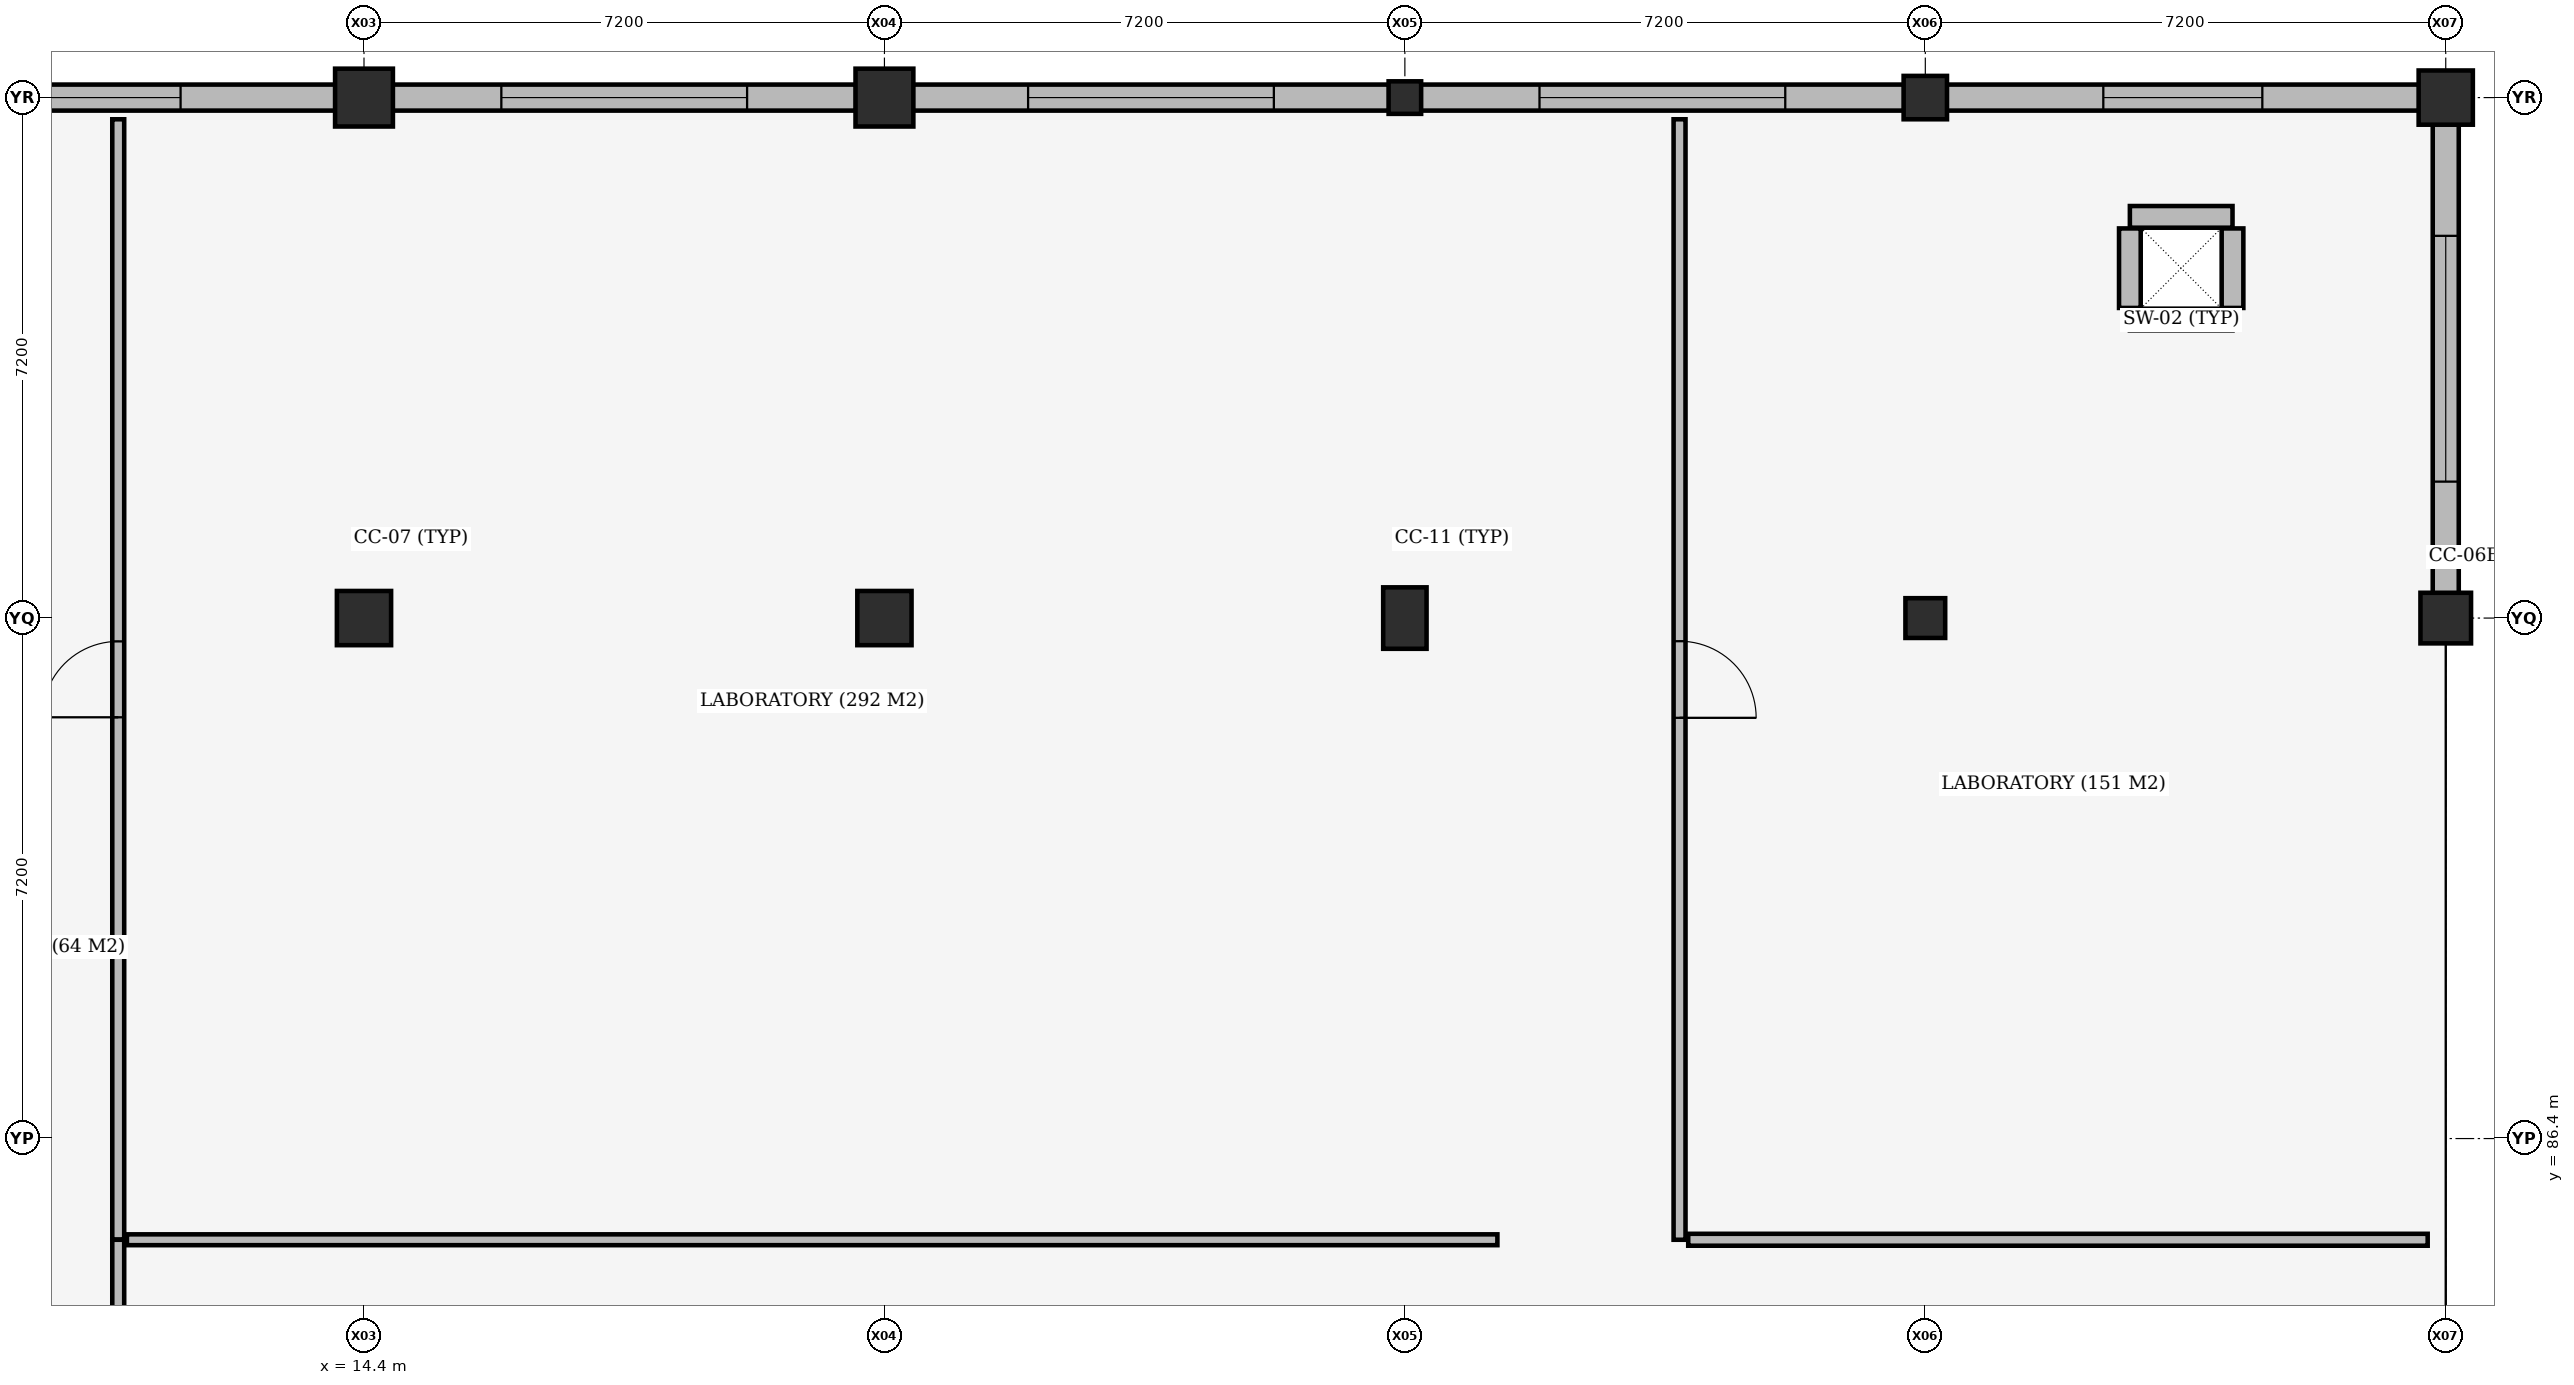
"""IFC4 building model, lengths in metres.
Left out: names, types, materials, properties, quantities, classifications, styles, units other than length and angle.
Written with IfcOpenShell. Run it as: python <this file> out.ifc"""

import sys

from ifc_helpers import new_model, si_unit, direction, frame, frame_2d, origin, origin_2d, place, context, subcontext, project, spatial, rectangle, extrude, element, fill, save


model = new_model("IFC4")
c1 = context("Model", 3, precision=1e-05, world=origin(), true_north=direction((0.0, 1.0)))
c2 = subcontext(c1, "Body", "Model", "MODEL_VIEW")
j1 = project(units=[si_unit("LENGTHUNIT", "METRE"), si_unit("PLANEANGLEUNIT", "RADIAN")], contexts=[c1])
p1 = place(None, origin())
s1 = spatial("IfcSite", under=j1, at=p1, CompositionType="ELEMENT")
p2 = place(p1, origin())
s2 = spatial("IfcBuilding", under=s1, at=p2, CompositionType="ELEMENT")
p3 = place(p2, frame((0.0, 0.0, 5.4)))
s3 = spatial("IfcBuildingStorey", under=s2, at=p3, CompositionType="ELEMENT", Elevation=5.4)
p4 = place(p3, frame((38.83, 97.73, 0.0), z_axis=(0.0, 0.0, 1.0), x_axis=(1.0, 0.0, 0.0)))
e1 = element("IfcWall", 1, at=p4, inside=s3, PredefinedType="SHEAR", context=c2, shape_type="SweptSolid", body=[
    extrude(rectangle(XDim=1.42, YDim=0.3, at=frame_2d((0.71, 0.0))), origin(), (0.0, 0.0, 1.0), 3.96),
])
p5 = place(p3, frame((40.25, 97.89, 0.0), z_axis=(0.0, 0.0, 1.0), x_axis=(0.0, 1.0, 0.0)))
e2 = element("IfcWall", 2, at=p5, inside=s3, PredefinedType="SHEAR", context=c2, shape_type="SweptSolid", body=[
    extrude(rectangle(XDim=1.1, YDim=0.3, at=frame_2d((0.55, 0.0))), origin(), (0.0, 0.0, 1.0), 3.96),
])
p6 = place(p3, frame((40.25, 99.15, 0.0), z_axis=(0.0, 0.0, 1.0), x_axis=(-1.0, 0.0, 0.0)))
e3 = element("IfcWall", 3, at=p6, inside=s3, PredefinedType="SHEAR", context=c2, shape_type="SweptSolid", body=[
    extrude(rectangle(XDim=1.42, YDim=0.3, at=frame_2d((0.71, 0.0))), origin(), (0.0, 0.0, 1.0), 3.96),
])
p7 = place(p3, frame((38.83, 98.99, 0.0), z_axis=(0.0, 0.0, 1.0), x_axis=(0.0, -1.0, 0.0)))
e4 = element("IfcWall", 4, at=p7, inside=s3, PredefinedType="SHEAR", context=c2, shape_type="SweptSolid", body=[
    extrude(rectangle(XDim=1.1, YDim=0.3, at=frame_2d((0.55, 0.0))), origin(), (0.0, 0.0, 1.0), 3.96),
])
p8 = place(p3, frame((14.4, 93.6, 0.0), z_axis=(0.0, 0.0, 1.0), x_axis=(1.0, 0.0, 0.0)))
e5 = element("IfcColumn", 5, at=p8, inside=s3, PredefinedType="COLUMN", context=c2, shape_type="SweptSolid", body=[
    extrude(rectangle(XDim=0.75, YDim=0.75, at=origin_2d()), origin(), (0.0, 0.0, 1.0), 3.89),
])
p9 = place(p3, frame((14.4, 100.8, 0.0), z_axis=(0.0, 0.0, 1.0), x_axis=(1.0, 0.0, 0.0)))
e6 = element("IfcColumn", 6, at=p9, inside=s3, PredefinedType="COLUMN", context=c2, shape_type="SweptSolid", body=[
    extrude(rectangle(XDim=0.8, YDim=0.8, at=origin_2d()), origin(), (0.0, 0.0, 1.0), 3.89),
])
p10 = place(p3, frame((21.6, 93.6, 0.0), z_axis=(0.0, 0.0, 1.0), x_axis=(1.0, 0.0, 0.0)))
e7 = element("IfcColumn", 7, at=p10, inside=s3, PredefinedType="COLUMN", context=c2, shape_type="SweptSolid", body=[
    extrude(rectangle(XDim=0.75, YDim=0.75, at=origin_2d()), origin(), (0.0, 0.0, 1.0), 3.89),
])
p11 = place(p3, frame((21.6, 100.8, 0.0), z_axis=(0.0, 0.0, 1.0), x_axis=(1.0, 0.0, 0.0)))
e8 = element("IfcColumn", 8, at=p11, inside=s3, PredefinedType="COLUMN", context=c2, shape_type="SweptSolid", body=[
    extrude(rectangle(XDim=0.8, YDim=0.8, at=origin_2d()), origin(), (0.0, 0.0, 1.0), 3.89),
])
p12 = place(p3, frame((28.8, 93.6, 0.0), z_axis=(0.0, 0.0, 1.0), x_axis=(1.0, 0.0, 0.0)))
e9 = element("IfcColumn", 9, at=p12, inside=s3, PredefinedType="COLUMN", context=c2, shape_type="SweptSolid", body=[
    extrude(rectangle(XDim=0.6, YDim=0.85, at=origin_2d()), origin(), (0.0, 0.0, 1.0), 3.89),
])
p13 = place(p3, frame((28.8, 100.8, 0.0), z_axis=(0.0, 0.0, 1.0), x_axis=(1.0, 0.0, 0.0)))
e10 = element("IfcColumn", 10, at=p13, inside=s3, PredefinedType="COLUMN", context=c2, shape_type="SweptSolid", body=[
    extrude(rectangle(XDim=0.45, YDim=0.45, at=origin_2d()), origin(), (0.0, 0.0, 1.0), 3.89),
])
p14 = place(p3, frame((36.0, 93.6, 0.0), z_axis=(0.0, 0.0, 1.0), x_axis=(1.0, 0.0, 0.0)))
e11 = element("IfcColumn", 11, at=p14, inside=s3, PredefinedType="COLUMN", context=c2, shape_type="SweptSolid", body=[
    extrude(rectangle(XDim=0.55, YDim=0.55, at=origin_2d()), origin(), (0.0, 0.0, 1.0), 3.89),
])
p15 = place(p3, frame((36.0, 100.8, 0.0), z_axis=(0.0, 0.0, 1.0), x_axis=(1.0, 0.0, 0.0)))
e12 = element("IfcColumn", 12, at=p15, inside=s3, PredefinedType="COLUMN", context=c2, shape_type="SweptSolid", body=[
    extrude(rectangle(XDim=0.6, YDim=0.6, at=origin_2d()), origin(), (0.0, 0.0, 1.0), 3.89),
])
p16 = place(p3, frame((43.2, 93.6, 0.0), z_axis=(0.0, 0.0, 1.0), x_axis=(1.0, 0.0, 0.0)))
e13 = element("IfcColumn", 13, at=p16, inside=s3, PredefinedType="COLUMN", context=c2, shape_type="SweptSolid", body=[
    extrude(rectangle(XDim=0.7, YDim=0.7, at=origin_2d()), origin(), (0.0, 0.0, 1.0), 3.89),
])
p17 = place(p3, frame((43.2, 100.8, 0.0), z_axis=(0.0, 0.0, 1.0), x_axis=(1.0, 0.0, 0.0)))
e14 = element("IfcColumn", 14, at=p17, inside=s3, PredefinedType="COLUMN", context=c2, shape_type="SweptSolid", body=[
    extrude(rectangle(XDim=0.75, YDim=0.75, at=origin_2d()), origin(), (0.0, 0.0, 1.0), 3.89),
])
p18 = place(p3, frame((7.517, 100.8, 0.0), z_axis=(0.0, 0.0, 1.0), x_axis=(1.0, 0.0, 0.0)))
e15 = element("IfcWall", 15, at=p18, inside=s3, PredefinedType="STANDARD", context=c2, shape_type="SweptSolid", body=[
    extrude(rectangle(XDim=6.491, YDim=0.36, at=frame_2d((3.246, 0.0))), origin(), (0.0, 0.0, 1.0), 3.31),
])
p19 = place(p18, frame((2.146, 0.0, 0.9)))
e16 = element("IfcOpeningElement", 16, at=p19, cuts=e15, PredefinedType="OPENING", context=c2, shape_type="SweptSolid", body=[
    extrude(rectangle(XDim=2.2, YDim=2.2, at=frame_2d((1.1, 1.1))), frame((0.0, 0.19, 0.0), z_axis=(0.0, -1.0, 0.0), x_axis=(1.0, 0.0, 0.0)), (0.0, 0.0, 1.0), 0.38),
])
p20 = place(p3, frame((14.792, 100.8, 0.0), z_axis=(0.0, 0.0, 1.0), x_axis=(1.0, 0.0, 0.0)))
e17 = element("IfcWall", 17, at=p20, inside=s3, PredefinedType="STANDARD", context=c2, shape_type="SweptSolid", body=[
    extrude(rectangle(XDim=6.416, YDim=0.36, at=frame_2d((3.208, 0.0))), origin(), (0.0, 0.0, 1.0), 3.25),
])
p21 = place(p20, frame((1.508, 0.0, 0.9)))
e18 = element("IfcOpeningElement", 18, at=p21, cuts=e17, PredefinedType="OPENING", context=c2, shape_type="SweptSolid", body=[
    extrude(rectangle(XDim=3.4, YDim=1.5, at=frame_2d((1.7, 0.75))), frame((0.0, 0.19, 0.0), z_axis=(0.0, -1.0, 0.0), x_axis=(1.0, 0.0, 0.0)), (0.0, 0.0, 1.0), 0.38),
])
p22 = place(p3, frame((21.992, 100.8, 0.0), z_axis=(0.0, 0.0, 1.0), x_axis=(1.0, 0.0, 0.0)))
e19 = element("IfcWall", 19, at=p22, inside=s3, PredefinedType="STANDARD", context=c2, shape_type="SweptSolid", body=[
    extrude(rectangle(XDim=6.591, YDim=0.36, at=frame_2d((3.295, 0.0))), origin(), (0.0, 0.0, 1.0), 3.21),
])
p23 = place(p22, frame((1.595, 0.0, 0.9)))
e20 = element("IfcOpeningElement", 20, at=p23, cuts=e19, PredefinedType="OPENING", context=c2, shape_type="SweptSolid", body=[
    extrude(rectangle(XDim=3.4, YDim=1.5, at=frame_2d((1.7, 0.75))), frame((0.0, 0.19, 0.0), z_axis=(0.0, -1.0, 0.0), x_axis=(1.0, 0.0, 0.0)), (0.0, 0.0, 1.0), 0.38),
])
p24 = place(p3, frame((29.017, 100.8, 0.0), z_axis=(0.0, 0.0, 1.0), x_axis=(1.0, 0.0, 0.0)))
e21 = element("IfcWall", 21, at=p24, inside=s3, PredefinedType="STANDARD", context=c2, shape_type="SweptSolid", body=[
    extrude(rectangle(XDim=6.691, YDim=0.36, at=frame_2d((3.345, 0.0))), origin(), (0.0, 0.0, 1.0), 3.15),
])
p25 = place(p24, frame((1.646, 0.0, 0.9)))
e22 = element("IfcOpeningElement", 22, at=p25, cuts=e21, PredefinedType="OPENING", context=c2, shape_type="SweptSolid", body=[
    extrude(rectangle(XDim=3.4, YDim=1.5, at=frame_2d((1.7, 0.75))), frame((0.0, 0.19, 0.0), z_axis=(0.0, -1.0, 0.0), x_axis=(1.0, 0.0, 0.0)), (0.0, 0.0, 1.0), 0.38),
])
p26 = place(p3, frame((36.292, 100.8, 0.0), z_axis=(0.0, 0.0, 1.0), x_axis=(1.0, 0.0, 0.0)))
e23 = element("IfcWall", 23, at=p26, inside=s3, PredefinedType="STANDARD", context=c2, shape_type="SweptSolid", body=[
    extrude(rectangle(XDim=6.541, YDim=0.36, at=frame_2d((3.271, 0.0))), origin(), (0.0, 0.0, 1.0), 3.37),
])
p27 = place(p26, frame((2.17, 0.0, 0.9)))
e24 = element("IfcOpeningElement", 24, at=p27, cuts=e23, PredefinedType="OPENING", context=c2, shape_type="SweptSolid", body=[
    extrude(rectangle(XDim=2.2, YDim=2.2, at=frame_2d((1.1, 1.1))), frame((0.0, 0.19, 0.0), z_axis=(0.0, -1.0, 0.0), x_axis=(1.0, 0.0, 0.0)), (0.0, 0.0, 1.0), 0.38),
])
p28 = place(p3, frame((43.2, 100.433, 0.0), z_axis=(0.0, 0.0, 1.0), x_axis=(0.0, -1.0, 0.0)))
e25 = element("IfcWall", 25, at=p28, inside=s3, PredefinedType="STANDARD", context=c2, shape_type="SweptSolid", body=[
    extrude(rectangle(XDim=6.491, YDim=0.36, at=frame_2d((3.246, 0.0))), origin(), (0.0, 0.0, 1.0), 3.21),
])
p29 = place(p28, frame((1.545, 0.0, 0.9)))
e26 = element("IfcOpeningElement", 26, at=p29, cuts=e25, PredefinedType="OPENING", context=c2, shape_type="SweptSolid", body=[
    extrude(rectangle(XDim=3.4, YDim=1.5, at=frame_2d((1.7, 0.75))), frame((0.0, 0.19, 0.0), z_axis=(0.0, -1.0, 0.0), x_axis=(1.0, 0.0, 0.0)), (0.0, 0.0, 1.0), 0.38),
])
p30 = place(p3, frame((11.0, 75.605, 0.0), z_axis=(0.0, 0.0, 1.0), x_axis=(0.0, 1.0, 0.0)))
e27 = element("IfcWall", 27, at=p30, inside=s3, PredefinedType="PARTITIONING", context=c2, shape_type="SweptSolid", body=[
    extrude(rectangle(XDim=9.395, YDim=0.165, at=frame_2d((4.698, 0.0))), origin(), (0.0, 0.0, 1.0), 3.15),
])
p31 = place(p30, frame((4.167, 0.0, 0.0)))
e28 = element("IfcOpeningElement", 28, at=p31, cuts=e27, PredefinedType="OPENING", context=c2, shape_type="SweptSolid", body=[
    extrude(rectangle(XDim=1.06, YDim=2.2, at=frame_2d((0.53, 1.1))), frame((0.0, 0.093, 0.0), z_axis=(0.0, -1.0, 0.0), x_axis=(1.0, 0.0, 0.0)), (0.0, 0.0, 1.0), 0.185),
])
p32 = place(p3, frame((11.12, 85.0, 0.0), z_axis=(0.0, 0.0, 1.0), x_axis=(1.0, 0.0, 0.0)))
e29 = element("IfcWall", 29, at=p32, inside=s3, PredefinedType="PARTITIONING", context=c2, shape_type="SweptSolid", body=[
    extrude(rectangle(XDim=18.96, YDim=0.15, at=frame_2d((9.48, 0.0))), origin(), (0.0, 0.0, 1.0), 3.15),
])
p33 = place(p3, frame((11.0, 85.005, 0.0), z_axis=(0.0, 0.0, 1.0), x_axis=(0.0, 1.0, 0.0)))
e30 = element("IfcWall", 30, at=p33, inside=s3, PredefinedType="PARTITIONING", context=c2, shape_type="SweptSolid", body=[
    extrude(rectangle(XDim=15.495, YDim=0.165, at=frame_2d((7.748, 0.0))), origin(), (0.0, 0.0, 1.0), 3.37),
])
p34 = place(p33, frame((7.222, 0.0, 0.0)))
e31 = element("IfcOpeningElement", 31, at=p34, cuts=e30, PredefinedType="OPENING", context=c2, shape_type="SweptSolid", body=[
    extrude(rectangle(XDim=1.05, YDim=2.2, at=frame_2d((0.525, 1.1))), frame((0.0, 0.093, 0.0), z_axis=(0.0, -1.0, 0.0), x_axis=(1.0, 0.0, 0.0)), (0.0, 0.0, 1.0), 0.185),
])
p35 = place(p3, frame((32.6, 85.0, 0.0), z_axis=(0.0, 0.0, 1.0), x_axis=(0.0, 1.0, 0.0)))
e32 = element("IfcWall", 32, at=p35, inside=s3, PredefinedType="PARTITIONING", context=c2, shape_type="SweptSolid", body=[
    extrude(rectangle(XDim=15.5, YDim=0.165, at=frame_2d((7.75, 0.0))), origin(), (0.0, 0.0, 1.0), 3.21),
])
p36 = place(p35, frame((7.22, 0.0, 0.0)))
e33 = element("IfcOpeningElement", 33, at=p36, cuts=e32, PredefinedType="OPENING", context=c2, shape_type="SweptSolid", body=[
    extrude(rectangle(XDim=1.06, YDim=2.2, at=frame_2d((0.53, 1.1))), frame((0.0, 0.093, 0.0), z_axis=(0.0, -1.0, 0.0), x_axis=(1.0, 0.0, 0.0)), (0.0, 0.0, 1.0), 0.185),
])
p37 = place(p3, frame((32.72, 85.0, 0.0), z_axis=(0.0, 0.0, 1.0), x_axis=(1.0, 0.0, 0.0)))
e34 = element("IfcWall", 34, at=p37, inside=s3, PredefinedType="PARTITIONING", context=c2, shape_type="SweptSolid", body=[
    extrude(rectangle(XDim=10.23, YDim=0.165, at=frame_2d((5.115, 0.0))), origin(), (0.0, 0.0, 1.0), 3.37),
])
p38 = place(p19, origin())
e35 = element("IfcWindow", 35, at=p38, inside=s3, PartitioningType="DOUBLE_PANEL_VERTICAL", PredefinedType="WINDOW", context=c2, shape_type="SweptSolid", body=[
    extrude(rectangle(XDim=2.2, YDim=2.2, at=frame_2d((1.1, 1.1))), frame((0.0, 0.03, 0.0), z_axis=(0.0, -1.0, 0.0), x_axis=(1.0, 0.0, 0.0)), (0.0, 0.0, 1.0), 0.06),
])
fill(e16, e35)
p39 = place(p21, origin())
e36 = element("IfcWindow", 36, at=p39, inside=s3, PartitioningType="DOUBLE_PANEL_VERTICAL", PredefinedType="WINDOW", context=c2, shape_type="SweptSolid", body=[
    extrude(rectangle(XDim=3.4, YDim=1.5, at=frame_2d((1.7, 0.75))), frame((0.0, 0.03, 0.0), z_axis=(0.0, -1.0, 0.0), x_axis=(1.0, 0.0, 0.0)), (0.0, 0.0, 1.0), 0.06),
])
fill(e18, e36)
p40 = place(p23, origin())
e37 = element("IfcWindow", 37, at=p40, inside=s3, PartitioningType="DOUBLE_PANEL_VERTICAL", PredefinedType="WINDOW", context=c2, shape_type="SweptSolid", body=[
    extrude(rectangle(XDim=3.4, YDim=1.5, at=frame_2d((1.7, 0.75))), frame((0.0, 0.03, 0.0), z_axis=(0.0, -1.0, 0.0), x_axis=(1.0, 0.0, 0.0)), (0.0, 0.0, 1.0), 0.06),
])
fill(e20, e37)
p41 = place(p25, origin())
e38 = element("IfcWindow", 38, at=p41, inside=s3, PartitioningType="DOUBLE_PANEL_VERTICAL", PredefinedType="WINDOW", context=c2, shape_type="SweptSolid", body=[
    extrude(rectangle(XDim=3.4, YDim=1.5, at=frame_2d((1.7, 0.75))), frame((0.0, 0.03, 0.0), z_axis=(0.0, -1.0, 0.0), x_axis=(1.0, 0.0, 0.0)), (0.0, 0.0, 1.0), 0.06),
])
fill(e22, e38)
p42 = place(p27, origin())
e39 = element("IfcWindow", 39, at=p42, inside=s3, PartitioningType="DOUBLE_PANEL_VERTICAL", PredefinedType="WINDOW", context=c2, shape_type="SweptSolid", body=[
    extrude(rectangle(XDim=2.2, YDim=2.2, at=frame_2d((1.1, 1.1))), frame((0.0, 0.03, 0.0), z_axis=(0.0, -1.0, 0.0), x_axis=(1.0, 0.0, 0.0)), (0.0, 0.0, 1.0), 0.06),
])
fill(e24, e39)
p43 = place(p29, origin())
e40 = element("IfcWindow", 40, at=p43, inside=s3, PartitioningType="DOUBLE_PANEL_VERTICAL", PredefinedType="WINDOW", context=c2, shape_type="SweptSolid", body=[
    extrude(rectangle(XDim=3.4, YDim=1.5, at=frame_2d((1.7, 0.75))), frame((0.0, 0.03, 0.0), z_axis=(0.0, -1.0, 0.0), x_axis=(1.0, 0.0, 0.0)), (0.0, 0.0, 1.0), 0.06),
])
fill(e26, e40)
p44 = place(p34, origin())
e41 = element("IfcDoor", 41, at=p44, inside=s3, OperationType="SINGLE_SWING_LEFT", PredefinedType="DOOR", context=c2, shape_type="SweptSolid", body=[
    extrude(rectangle(XDim=1.05, YDim=2.2, at=frame_2d((0.525, 1.1))), frame((0.0, 0.025, 0.0), z_axis=(0.0, -1.0, 0.0), x_axis=(1.0, 0.0, 0.0)), (0.0, 0.0, 1.0), 0.05),
])
fill(e31, e41)
p45 = place(p36, origin())
e42 = element("IfcDoor", 42, at=p45, inside=s3, OperationType="SINGLE_SWING_RIGHT", PredefinedType="DOOR", context=c2, shape_type="SweptSolid", body=[
    extrude(rectangle(XDim=1.06, YDim=2.2, at=frame_2d((0.53, 1.1))), frame((0.0, 0.025, 0.0), z_axis=(0.0, -1.0, 0.0), x_axis=(1.0, 0.0, 0.0)), (0.0, 0.0, 1.0), 0.05),
])
fill(e33, e42)
save(model, sys.argv[1])
